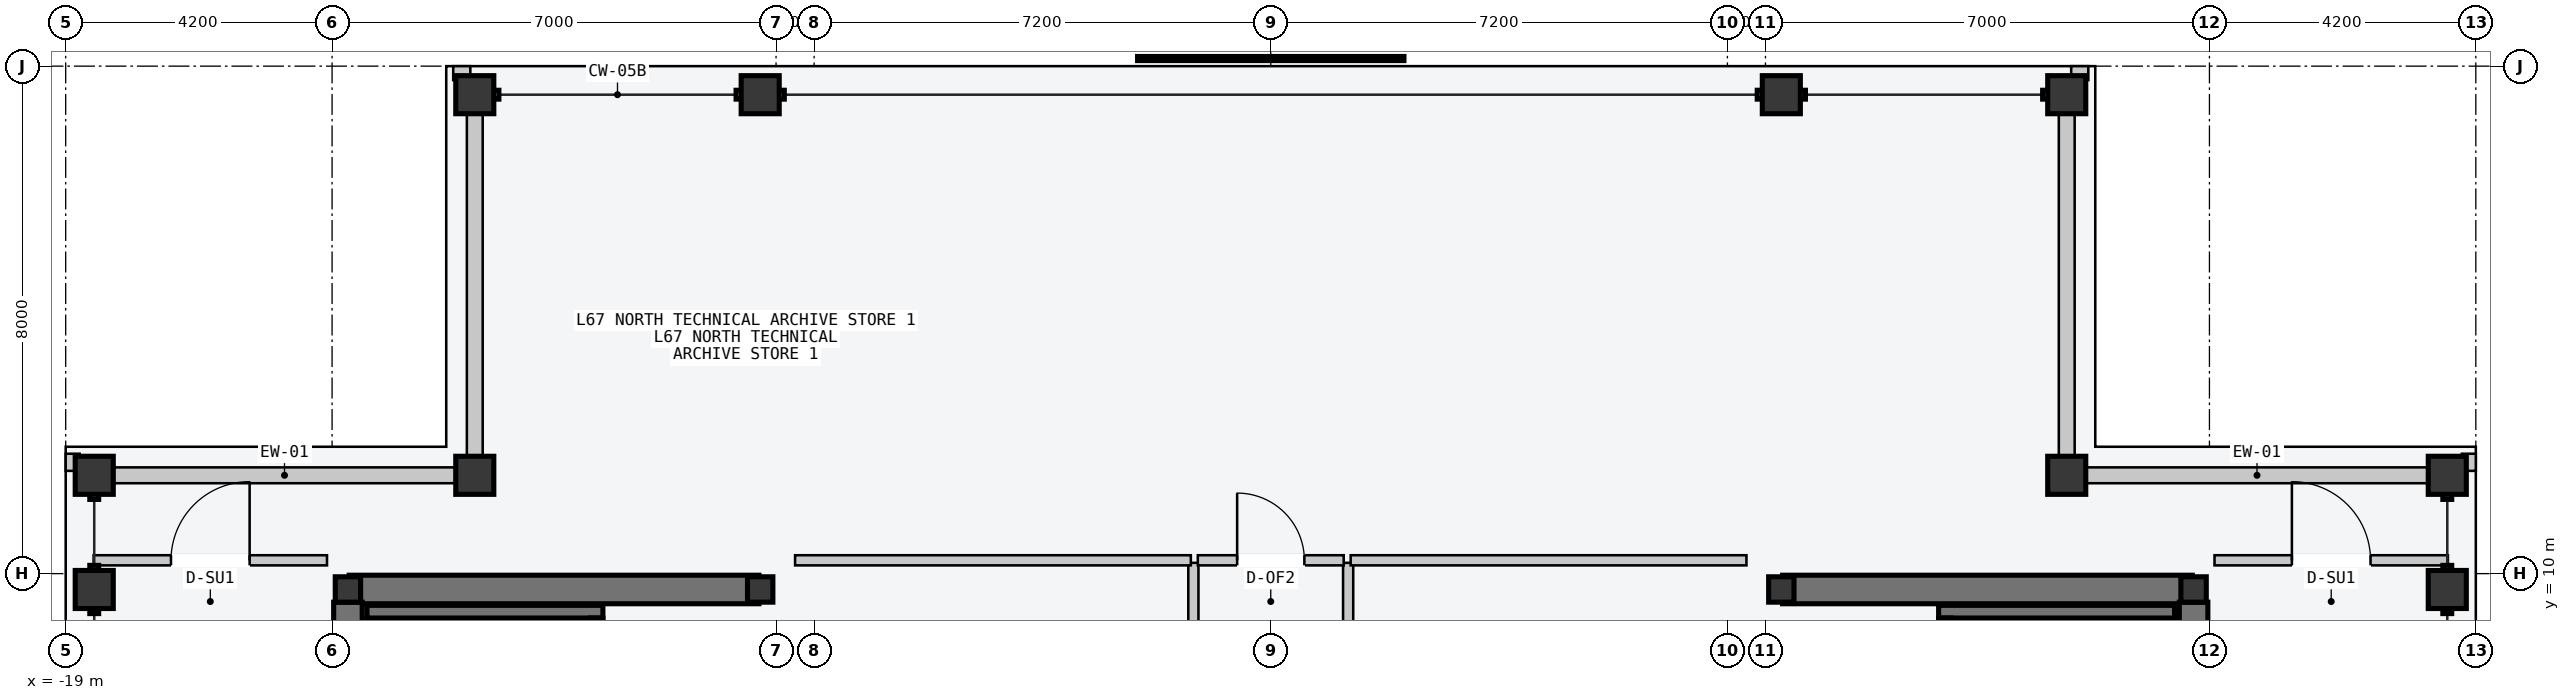
"""IFC4 building model, lengths in metres.
Left out: names, types, materials, properties, quantities, classifications, styles, units other than length and angle.
Written with IfcOpenShell. Run it as: python <this file> out.ifc"""

import sys

from ifc_helpers import new_model, si_unit, direction, frame, frame_2d, origin, origin_2d, place, context, subcontext, project, spatial, rectangle, hollow_rectangle, i_section, extrude, element, fill, save


model = new_model("IFC4")
c1 = context("Model", 3, precision=1e-05, world=origin(), true_north=direction((0.0, 1.0)))
c2 = subcontext(c1, "Body", "Model", "MODEL_VIEW")
j1 = project(units=[si_unit("LENGTHUNIT", "METRE"), si_unit("PLANEANGLEUNIT", "RADIAN")], contexts=[c1])
p1 = place(None, origin())
s1 = spatial("IfcSite", under=j1, at=p1, CompositionType="ELEMENT")
p2 = place(p1, origin())
s2 = spatial("IfcBuilding", under=s1, at=p2, CompositionType="ELEMENT")
p3 = place(p2, frame((0.0, 0.0, 254.4)))
s3 = spatial("IfcBuildingStorey", under=s2, at=p3, CompositionType="ELEMENT", Elevation=254.4)
p4 = place(p3, frame((-14.53, 9.75, -0.2), z_axis=(0.0, 0.0, 1.0), x_axis=(1.0, 0.0, 0.0)))
e1 = element("IfcWall", 1, at=p4, inside=s3, PredefinedType="SHEAR", context=c2, shape_type="SweptSolid", body=[
    extrude(rectangle(XDim=6.46, YDim=0.45, at=frame_2d((3.23, 0.0))), origin(), (0.0, 0.0, 1.0), 3.6),
])
p5 = place(p3, frame((-14.55, 0.2, -0.2), z_axis=(0.0, 0.0, 1.0), x_axis=(0.0, 1.0, 0.0)))
e2 = element("IfcWall", 2, at=p5, inside=s3, PredefinedType="SHEAR", context=c2, shape_type="SweptSolid", body=[
    extrude(rectangle(XDim=9.35, YDim=0.45, at=frame_2d((4.675, 0.0))), origin(), (0.0, 0.0, 1.0), 3.6),
])
p6 = place(p3, frame((8.07, 9.75, -0.2), z_axis=(0.0, 0.0, 1.0), x_axis=(1.0, 0.0, 0.0)))
e3 = element("IfcWall", 3, at=p6, inside=s3, PredefinedType="SHEAR", context=c2, shape_type="SweptSolid", body=[
    extrude(rectangle(XDim=6.46, YDim=0.45, at=frame_2d((3.23, 0.0))), origin(), (0.0, 0.0, 1.0), 3.6),
])
p7 = place(p3, frame((14.55, 0.2, -0.2), z_axis=(0.0, 0.0, 1.0), x_axis=(0.0, 1.0, 0.0)))
e4 = element("IfcWall", 4, at=p7, inside=s3, PredefinedType="SHEAR", context=c2, shape_type="SweptSolid", body=[
    extrude(rectangle(XDim=9.35, YDim=0.45, at=frame_2d((4.675, 0.0))), origin(), (0.0, 0.0, 1.0), 3.6),
])
for number, where, z_axis, x_axis in (
    (5, (-14.15, 1.5, -0.2), (0.0, 0.0, 1.0), (0.0, 1.0, 0.0)),
    (6, (14.15, 1.5, -0.2), (0.0, 0.0, 1.0), (0.0, 1.0, 0.0)),
):
    element("IfcWall", number, at=place(p3, frame(where, z_axis=z_axis, x_axis=x_axis)), inside=s3, PredefinedType="SOLIDWALL", context=c2, shape_type="SweptSolid", body=[
        extrude(rectangle(XDim=7.8, YDim=0.2, at=frame_2d((3.9, 0.0))), origin(), (0.0, 0.0, 1.0), 3.6),
    ])
p8 = place(p3, frame((-14.25, 9.4, -0.2), z_axis=(0.0, 0.0, 1.0), x_axis=(1.0, 0.0, 0.0)))
e7 = element("IfcWall", 7, at=p8, inside=s3, PredefinedType="SOLIDWALL", context=c2, shape_type="SweptSolid", body=[
    extrude(rectangle(XDim=3.72, YDim=0.2, at=frame_2d((1.86, 0.0))), origin(), (0.0, 0.0, 1.0), 3.6),
])
p9 = place(p3, frame((-10.63, 1.5, -0.2), z_axis=(0.0, 0.0, 1.0), x_axis=(0.0, 1.0, 0.0)))
e8 = element("IfcWall", 8, at=p9, inside=s3, PredefinedType="SOLIDWALL", context=c2, shape_type="SweptSolid", body=[
    extrude(rectangle(XDim=7.8, YDim=0.2, at=frame_2d((3.9, 0.0))), origin(), (0.0, 0.0, 1.0), 3.6),
])
p10 = place(p3, frame((10.53, 9.4, -0.2), z_axis=(0.0, 0.0, 1.0), x_axis=(1.0, 0.0, 0.0)))
e9 = element("IfcWall", 9, at=p10, inside=s3, PredefinedType="SOLIDWALL", context=c2, shape_type="SweptSolid", body=[
    extrude(rectangle(XDim=3.72, YDim=0.2, at=frame_2d((1.86, 0.0))), origin(), (0.0, 0.0, 1.0), 3.6),
])
p11 = place(p3, frame((10.63, 1.5, -0.2), z_axis=(0.0, 0.0, 1.0), x_axis=(0.0, 1.0, 0.0)))
e10 = element("IfcWall", 10, at=p11, inside=s3, PredefinedType="SOLIDWALL", context=c2, shape_type="SweptSolid", body=[
    extrude(rectangle(XDim=7.8, YDim=0.2, at=frame_2d((3.9, 0.0))), origin(), (0.0, 0.0, 1.0), 3.6),
])
for number, where, z_axis, x_axis in (
    (11, (-14.55, 9.75, 0.0), (0.0, 0.0, 1.0), (1.0, 0.0, 0.0)),
    (12, (-8.05, 9.75, 0.0), (0.0, 0.0, 1.0), (1.0, 0.0, 0.0)),
    (13, (8.05, 9.75, 0.0), (0.0, 0.0, 1.0), (1.0, 0.0, 0.0)),
    (14, (14.55, 9.75, 0.0), (0.0, 0.0, 1.0), (1.0, 0.0, 0.0)),
):
    element("IfcColumn", number, at=place(p3, frame(where, z_axis=z_axis, x_axis=x_axis)), inside=s3, PredefinedType="COLUMN", context=c2, shape_type="SweptSolid", body=[
        extrude(i_section(OverallWidth=0.4, OverallDepth=0.4, WebThickness=0.013, FlangeThickness=0.021, at=origin_2d()), origin(), (0.0, 0.0, 1.0), 3.6),
    ])
for number, where, z_axis, x_axis in (
    (15, (-12.55, 17.55, 0.0), (0.0, 0.0, 1.0), (1.0, 0.0, 0.0)),
    (16, (-8.05, 17.55, 0.0), (0.0, 0.0, 1.0), (1.0, 0.0, 0.0)),
    (17, (8.05, 17.55, 0.0), (0.0, 0.0, 1.0), (1.0, 0.0, 0.0)),
    (18, (12.55, 17.55, 0.0), (0.0, 0.0, 1.0), (1.0, 0.0, 0.0)),
    (19, (-18.55, 9.75, 0.0), (0.0, 0.0, 1.0), (0.0, 1.0, 0.0)),
    (20, (-18.55, 11.55, 0.0), (0.0, 0.0, 1.0), (0.0, 1.0, 0.0)),
    (21, (18.55, 9.75, 0.0), (0.0, 0.0, 1.0), (0.0, 1.0, 0.0)),
    (22, (18.55, 11.55, 0.0), (0.0, 0.0, 1.0), (0.0, 1.0, 0.0)),
    (23, (-12.55, 11.55, 0.0), (0.0, 0.0, 1.0), (1.0, 0.0, 0.0)),
    (24, (12.55, 11.55, 0.0), (0.0, 0.0, 1.0), (1.0, 0.0, 0.0)),
):
    element("IfcColumn", number, at=place(p3, frame(where, z_axis=z_axis, x_axis=x_axis)), inside=s3, PredefinedType="COLUMN", context=c2, shape_type="SweptSolid", body=[
        extrude(hollow_rectangle(XDim=0.6, YDim=0.6, WallThickness=0.025, at=origin_2d()), origin(), (0.0, 0.0, 1.0), 3.6),
    ])
for number, where, z_axis, x_axis in (
    (25, (-18.24, 11.55, 0.0), (0.0, 0.0, 1.0), (1.0, 0.0, 0.0)),
    (26, (-12.55, 11.86, 0.0), (0.0, 0.0, 1.0), (0.0, 1.0, 0.0)),
    (27, (12.86, 11.55, 0.0), (0.0, 0.0, 1.0), (1.0, 0.0, 0.0)),
    (28, (12.55, 11.86, 0.0), (0.0, 0.0, 1.0), (0.0, 1.0, 0.0)),
):
    element("IfcWall", number, at=place(p3, frame(where, z_axis=z_axis, x_axis=x_axis)), inside=s3, PredefinedType="STANDARD", context=c2, shape_type="SweptSolid", body=[
        extrude(rectangle(XDim=5.38, YDim=0.25, at=frame_2d((2.69, 0.0))), origin(), (0.0, 0.0, 1.0), 2.85),
    ])
for number, where, z_axis, x_axis in (
    (29, (-12.89, 17.89, 0.0), (0.0, 0.0, 1.0), (1.0, 0.0, 0.0)),
    (30, (-18.89, 11.62, 0.0), (0.0, 0.0, 1.0), (0.0, 1.0, 0.0)),
    (31, (12.62, 17.89, 0.0), (0.0, 0.0, 1.0), (1.0, 0.0, 0.0)),
    (32, (18.89, 11.62, 0.0), (0.0, 0.0, 1.0), (0.0, 1.0, 0.0)),
):
    element("IfcWall", number, at=place(p3, frame(where, z_axis=z_axis, x_axis=x_axis)), inside=s3, PredefinedType="PARAPET", context=c2, shape_type="SweptSolid", body=[
        extrude(rectangle(XDim=0.27, YDim=0.22, at=frame_2d((0.135, 0.0))), origin(), (0.0, 0.0, 1.0), 1.2),
    ])
p12 = place(p3, frame((-1.22, -3.5, 0.0), z_axis=(0.0, 0.0, 1.0), x_axis=(0.0, 1.0, 0.0)))
e33 = element("IfcWall", 33, at=p12, inside=s3, PredefinedType="PARTITIONING", context=c2, shape_type="SweptSolid", body=[
    extrude(rectangle(XDim=13.67, YDim=0.16, at=frame_2d((6.835, 0.0))), origin(), (0.0, 0.0, 1.0), 3.4),
])
p13 = place(p12, frame((6.1, 0.0, 0.0)))
e34 = element("IfcOpeningElement", 34, at=p13, cuts=e33, PredefinedType="OPENING", context=c2, shape_type="SweptSolid", body=[
    extrude(rectangle(XDim=1.24, YDim=2.24, at=frame_2d((0.62, 1.12))), frame((0.0, 0.09, 0.0), z_axis=(0.0, -1.0, 0.0), x_axis=(1.0, 0.0, 0.0)), (0.0, 0.0, 1.0), 0.18),
])
p14 = place(p12, frame((1.6, 0.0, 0.0)))
e35 = element("IfcOpeningElement", 35, at=p14, cuts=e33, PredefinedType="OPENING", context=c2, shape_type="SweptSolid", body=[
    extrude(rectangle(XDim=0.96, YDim=2.18, at=frame_2d((0.48, 1.09))), frame((0.0, 0.09, 0.0), z_axis=(0.0, -1.0, 0.0), x_axis=(1.0, 0.0, 0.0)), (0.0, 0.0, 1.0), 0.18),
])
p15 = place(p3, frame((-7.5, 10.21, 0.0), z_axis=(0.0, 0.0, 1.0), x_axis=(1.0, 0.0, 0.0)))
e36 = element("IfcWall", 36, at=p15, inside=s3, PredefinedType="PARTITIONING", context=c2, shape_type="SweptSolid", body=[
    extrude(rectangle(XDim=6.24, YDim=0.16, at=frame_2d((3.12, 0.0))), origin(), (0.0, 0.0, 1.0), 3.4),
])
p16 = place(p3, frame((1.22, -3.5, 0.0), z_axis=(0.0, 0.0, 1.0), x_axis=(0.0, 1.0, 0.0)))
e37 = element("IfcWall", 37, at=p16, inside=s3, PredefinedType="PARTITIONING", context=c2, shape_type="SweptSolid", body=[
    extrude(rectangle(XDim=13.67, YDim=0.16, at=frame_2d((6.835, 0.0))), origin(), (0.0, 0.0, 1.0), 3.4),
])
p17 = place(p16, frame((6.1, 0.0, 0.0)))
e38 = element("IfcOpeningElement", 38, at=p17, cuts=e37, PredefinedType="OPENING", context=c2, shape_type="SweptSolid", body=[
    extrude(rectangle(XDim=1.24, YDim=2.24, at=frame_2d((0.62, 1.12))), frame((0.0, 0.09, 0.0), z_axis=(0.0, -1.0, 0.0), x_axis=(1.0, 0.0, 0.0)), (0.0, 0.0, 1.0), 0.18),
])
p18 = place(p16, frame((1.6, 0.0, 0.0)))
e39 = element("IfcOpeningElement", 39, at=p18, cuts=e37, PredefinedType="OPENING", context=c2, shape_type="SweptSolid", body=[
    extrude(rectangle(XDim=0.96, YDim=2.18, at=frame_2d((0.48, 1.09))), frame((0.0, 0.09, 0.0), z_axis=(0.0, -1.0, 0.0), x_axis=(1.0, 0.0, 0.0)), (0.0, 0.0, 1.0), 0.18),
])
p19 = place(p3, frame((1.26, 10.21, 0.0), z_axis=(0.0, 0.0, 1.0), x_axis=(1.0, 0.0, 0.0)))
e40 = element("IfcWall", 40, at=p19, inside=s3, PredefinedType="PARTITIONING", context=c2, shape_type="SweptSolid", body=[
    extrude(rectangle(XDim=6.24, YDim=0.16, at=frame_2d((3.12, 0.0))), origin(), (0.0, 0.0, 1.0), 3.4),
])
p20 = place(p3, frame((-1.15, 10.21, 0.0), z_axis=(0.0, 0.0, 1.0), x_axis=(1.0, 0.0, 0.0)))
e41 = element("IfcWall", 41, at=p20, inside=s3, PredefinedType="PARTITIONING", context=c2, shape_type="SweptSolid", body=[
    extrude(rectangle(XDim=2.3, YDim=0.16, at=frame_2d((1.15, 0.0))), origin(), (0.0, 0.0, 1.0), 3.4),
])
p21 = place(p20, frame((0.62, 0.0, 0.0)))
e42 = element("IfcOpeningElement", 42, at=p21, cuts=e41, PredefinedType="OPENING", context=c2, shape_type="SweptSolid", body=[
    extrude(rectangle(XDim=1.06, YDim=2.2, at=frame_2d((0.53, 1.1))), frame((0.0, 0.09, 0.0), z_axis=(0.0, -1.0, 0.0), x_axis=(1.0, 0.0, 0.0)), (0.0, 0.0, 1.0), 0.18),
])
p22 = place(p3, frame((-18.56, 10.21, 0.0), z_axis=(0.0, 0.0, 1.0), x_axis=(1.0, 0.0, 0.0)))
e43 = element("IfcWall", 43, at=p22, inside=s3, PredefinedType="PARTITIONING", context=c2, shape_type="SweptSolid", body=[
    extrude(rectangle(XDim=3.68, YDim=0.16, at=frame_2d((1.84, 0.0))), origin(), (0.0, 0.0, 1.0), 3.4),
])
p23 = place(p22, frame((1.22, 0.0, 0.0)))
e44 = element("IfcOpeningElement", 44, at=p23, cuts=e43, PredefinedType="OPENING", context=c2, shape_type="SweptSolid", body=[
    extrude(rectangle(XDim=1.24, YDim=2.24, at=frame_2d((0.62, 1.12))), frame((0.0, 0.09, 0.0), z_axis=(0.0, -1.0, 0.0), x_axis=(1.0, 0.0, 0.0)), (0.0, 0.0, 1.0), 0.18),
])
p24 = place(p3, frame((14.88, 10.21, 0.0), z_axis=(0.0, 0.0, 1.0), x_axis=(1.0, 0.0, 0.0)))
e45 = element("IfcWall", 45, at=p24, inside=s3, PredefinedType="PARTITIONING", context=c2, shape_type="SweptSolid", body=[
    extrude(rectangle(XDim=3.68, YDim=0.16, at=frame_2d((1.84, 0.0))), origin(), (0.0, 0.0, 1.0), 3.4),
])
p25 = place(p24, frame((1.22, 0.0, 0.0)))
e46 = element("IfcOpeningElement", 46, at=p25, cuts=e45, PredefinedType="OPENING", context=c2, shape_type="SweptSolid", body=[
    extrude(rectangle(XDim=1.24, YDim=2.24, at=frame_2d((0.62, 1.12))), frame((0.0, 0.09, 0.0), z_axis=(0.0, -1.0, 0.0), x_axis=(1.0, 0.0, 0.0)), (0.0, 0.0, 1.0), 0.18),
])
p26 = place(p21, origin())
e47 = element("IfcDoor", 47, at=p26, inside=s3, OperationType="SINGLE_SWING_LEFT", PredefinedType="DOOR", context=c2, shape_type="SweptSolid", body=[
    extrude(rectangle(XDim=1.06, YDim=2.2, at=frame_2d((0.53, 1.1))), frame((0.0, 0.025, 0.0), z_axis=(0.0, -1.0, 0.0), x_axis=(1.0, 0.0, 0.0)), (0.0, 0.0, 1.0), 0.05),
])
fill(e42, e47)
p27 = place(p23, origin())
e48 = element("IfcDoor", 48, at=p27, inside=s3, OperationType="SINGLE_SWING_RIGHT", PredefinedType="DOOR", context=c2, shape_type="SweptSolid", body=[
    extrude(rectangle(XDim=1.24, YDim=2.24, at=frame_2d((0.62, 1.12))), frame((0.0, 0.025, 0.0), z_axis=(0.0, -1.0, 0.0), x_axis=(1.0, 0.0, 0.0)), (0.0, 0.0, 1.0), 0.05),
])
fill(e44, e48)
p28 = place(p25, origin())
e49 = element("IfcDoor", 49, at=p28, inside=s3, OperationType="SINGLE_SWING_LEFT", PredefinedType="DOOR", context=c2, shape_type="SweptSolid", body=[
    extrude(rectangle(XDim=1.24, YDim=2.24, at=frame_2d((0.62, 1.12))), frame((0.0, 0.025, 0.0), z_axis=(0.0, -1.0, 0.0), x_axis=(1.0, 0.0, 0.0)), (0.0, 0.0, 1.0), 0.05),
])
fill(e46, e49)
save(model, sys.argv[1])
